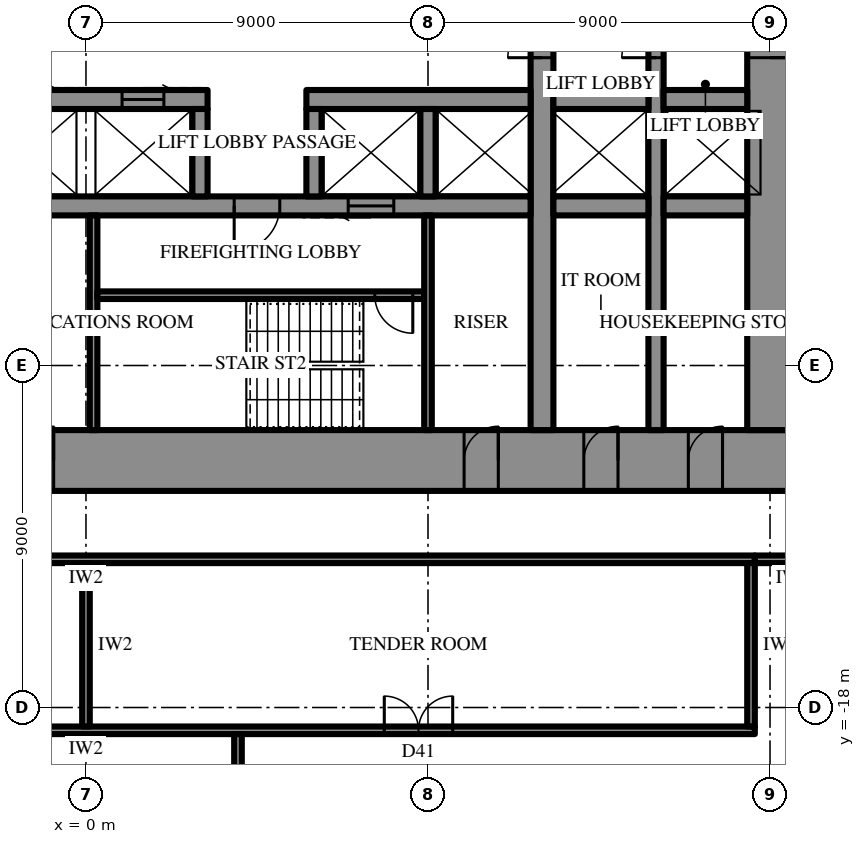
"""IFC4 building model, lengths in metres.
Left out: names, types, materials, properties, quantities, classifications, styles, units other than length and angle.
Written with IfcOpenShell. Run it as: python <this file> out.ifc"""

import sys

from ifc_helpers import new_model, si_unit, direction, frame, frame_2d, origin, place, context, subcontext, project, spatial, rectangle, extrude, element, fill, save


model = new_model("IFC4")
c1 = context("Model", 3, precision=1e-05, world=origin(), true_north=direction((0.0, 1.0)))
c2 = subcontext(c1, "Body", "Model", "MODEL_VIEW")
j1 = project(units=[si_unit("LENGTHUNIT", "METRE"), si_unit("PLANEANGLEUNIT", "RADIAN")], contexts=[c1])
p1 = place(None, origin())
s1 = spatial("IfcSite", under=j1, at=p1, CompositionType="ELEMENT")
p2 = place(p1, origin())
s2 = spatial("IfcBuilding", under=s1, at=p2, CompositionType="ELEMENT")
p3 = place(p2, frame((0.0, 0.0, 65.5)))
s3 = spatial("IfcBuildingStorey", under=s2, at=p3, CompositionType="ELEMENT", Elevation=65.5)
p4 = place(p3, frame((18.6, -11.5, 0.0), z_axis=(0.0, 0.0, 1.0), x_axis=(-1.0, 0.0, 0.0)))
e1 = element("IfcWall", 1, at=p4, inside=s3, PredefinedType="SHEAR", context=c2, shape_type="SweptSolid", body=[
    extrude(rectangle(XDim=37.2, YDim=1.6, at=frame_2d((18.6, 0.0))), origin(), (0.0, 0.0, 1.0), 4.2),
])
p5 = place(p4, frame((19.45, 0.0, 0.0)))
e2 = element("IfcOpeningElement", 2, at=p5, cuts=e1, PredefinedType="OPENING", context=c2, shape_type="SweptSolid", body=[
    extrude(rectangle(XDim=0.9, YDim=2.2, at=frame_2d((0.45, 1.1))), frame((0.0, 0.81, 0.0), z_axis=(0.0, -1.0, 0.0), x_axis=(1.0, 0.0, 0.0)), (0.0, 0.0, 1.0), 1.62),
])
p6 = place(p4, frame((22.45, 0.0, 0.0)))
e3 = element("IfcOpeningElement", 3, at=p6, cuts=e1, PredefinedType="OPENING", context=c2, shape_type="SweptSolid", body=[
    extrude(rectangle(XDim=0.9, YDim=2.2, at=frame_2d((0.45, 1.1))), frame((0.0, 0.81, 0.0), z_axis=(0.0, -1.0, 0.0), x_axis=(1.0, 0.0, 0.0)), (0.0, 0.0, 1.0), 1.62),
])
p7 = place(p4, frame((25.5, 0.0, 0.0)))
e4 = element("IfcOpeningElement", 4, at=p7, cuts=e1, PredefinedType="OPENING", context=c2, shape_type="SweptSolid", body=[
    extrude(rectangle(XDim=1.0, YDim=2.2, at=frame_2d((0.5, 1.1))), frame((0.0, 0.81, 0.0), z_axis=(0.0, -1.0, 0.0), x_axis=(1.0, 0.0, 0.0)), (0.0, 0.0, 1.0), 1.62),
])
p8 = place(p4, frame((1.85, 0.0, 0.0)))
e5 = element("IfcOpeningElement", 5, at=p8, cuts=e1, PredefinedType="OPENING", context=c2, shape_type="SweptSolid", body=[
    extrude(rectangle(XDim=0.9, YDim=2.2, at=frame_2d((0.45, 1.1))), frame((0.0, 0.81, 0.0), z_axis=(0.0, -1.0, 0.0), x_axis=(1.0, 0.0, 0.0)), (0.0, 0.0, 1.0), 1.62),
])
p9 = place(p4, frame((4.6, 0.0, 0.0)))
e6 = element("IfcOpeningElement", 6, at=p9, cuts=e1, PredefinedType="OPENING", context=c2, shape_type="SweptSolid", body=[
    extrude(rectangle(XDim=0.9, YDim=2.2, at=frame_2d((0.45, 1.1))), frame((0.0, 0.81, 0.0), z_axis=(0.0, -1.0, 0.0), x_axis=(1.0, 0.0, 0.0)), (0.0, 0.0, 1.0), 1.62),
])
p10 = place(p4, frame((7.75, 0.0, 0.0)))
e7 = element("IfcOpeningElement", 7, at=p10, cuts=e1, PredefinedType="OPENING", context=c2, shape_type="SweptSolid", body=[
    extrude(rectangle(XDim=0.9, YDim=2.2, at=frame_2d((0.45, 1.1))), frame((0.0, 0.81, 0.0), z_axis=(0.0, -1.0, 0.0), x_axis=(1.0, 0.0, 0.0)), (0.0, 0.0, 1.0), 1.62),
])
p11 = place(p4, frame((28.55, 0.0, 0.0)))
e8 = element("IfcOpeningElement", 8, at=p11, cuts=e1, PredefinedType="OPENING", context=c2, shape_type="SweptSolid", body=[
    extrude(rectangle(XDim=0.9, YDim=2.2, at=frame_2d((0.45, 1.1))), frame((0.0, 0.81, 0.0), z_axis=(0.0, -1.0, 0.0), x_axis=(1.0, 0.0, 0.0)), (0.0, 0.0, 1.0), 1.62),
])
p12 = place(p4, frame((31.7, 0.0, 0.0)))
e9 = element("IfcOpeningElement", 9, at=p12, cuts=e1, PredefinedType="OPENING", context=c2, shape_type="SweptSolid", body=[
    extrude(rectangle(XDim=0.9, YDim=2.2, at=frame_2d((0.45, 1.1))), frame((0.0, 0.81, 0.0), z_axis=(0.0, -1.0, 0.0), x_axis=(1.0, 0.0, 0.0)), (0.0, 0.0, 1.0), 1.62),
])
p13 = place(p4, frame((34.45, 0.0, 0.0)))
e10 = element("IfcOpeningElement", 10, at=p13, cuts=e1, PredefinedType="OPENING", context=c2, shape_type="SweptSolid", body=[
    extrude(rectangle(XDim=0.9, YDim=2.2, at=frame_2d((0.45, 1.1))), frame((0.0, 0.81, 0.0), z_axis=(0.0, -1.0, 0.0), x_axis=(1.0, 0.0, 0.0)), (0.0, 0.0, 1.0), 1.62),
])
p14 = place(p3, frame((18.0, -10.7, 0.0), z_axis=(0.0, 0.0, 1.0), x_axis=(0.0, 1.0, 0.0)))
e11 = element("IfcWall", 11, at=p14, inside=s3, PredefinedType="SHEAR", context=c2, shape_type="SweptSolid", body=[
    extrude(rectangle(XDim=21.4, YDim=1.2, at=frame_2d((10.7, 0.0))), origin(), (0.0, 0.0, 1.0), 4.2),
])
p15 = place(p14, frame((9.8, 0.0, 0.0)))
e12 = element("IfcOpeningElement", 12, at=p15, cuts=e11, PredefinedType="OPENING", context=c2, shape_type="SweptSolid", body=[
    extrude(rectangle(XDim=1.8, YDim=2.4, at=frame_2d((0.9, 1.2))), frame((0.0, 0.61, 0.0), z_axis=(0.0, -1.0, 0.0), x_axis=(1.0, 0.0, 0.0)), (0.0, 0.0, 1.0), 1.22),
])
p16 = place(p3, frame((12.0, -10.7, 0.0), z_axis=(0.0, 0.0, 1.0), x_axis=(0.0, 1.0, 0.0)))
e13 = element("IfcWall", 13, at=p16, inside=s3, PredefinedType="SHEAR", context=c2, shape_type="SweptSolid", body=[
    extrude(rectangle(XDim=21.4, YDim=0.6, at=frame_2d((10.7, 0.0))), origin(), (0.0, 0.0, 1.0), 4.2),
])
p17 = place(p16, frame((9.8, 0.0, 0.0)))
e14 = element("IfcOpeningElement", 14, at=p17, cuts=e13, PredefinedType="OPENING", context=c2, shape_type="SweptSolid", body=[
    extrude(rectangle(XDim=1.8, YDim=2.4, at=frame_2d((0.9, 1.2))), frame((0.0, 0.31, 0.0), z_axis=(0.0, -1.0, 0.0), x_axis=(1.0, 0.0, 0.0)), (0.0, 0.0, 1.0), 0.62),
])
p18 = place(p3, frame((15.0, -10.7, 0.0), z_axis=(0.0, 0.0, 1.0), x_axis=(0.0, 1.0, 0.0)))
e15 = element("IfcWall", 15, at=p18, inside=s3, PredefinedType="SHEAR", context=c2, shape_type="SweptSolid", body=[
    extrude(rectangle(XDim=21.4, YDim=0.4, at=frame_2d((10.7, 0.0))), origin(), (0.0, 0.0, 1.0), 4.2),
])
p19 = place(p18, frame((9.8, 0.0, 0.0)))
e16 = element("IfcOpeningElement", 16, at=p19, cuts=e15, PredefinedType="OPENING", context=c2, shape_type="SweptSolid", body=[
    extrude(rectangle(XDim=1.8, YDim=2.4, at=frame_2d((0.9, 1.2))), frame((0.0, 0.21, 0.0), z_axis=(0.0, -1.0, 0.0), x_axis=(1.0, 0.0, 0.0)), (0.0, 0.0, 1.0), 0.42),
])
p20 = place(p3, frame((17.4, -2.0, 0.0), z_axis=(0.0, 0.0, 1.0), x_axis=(-1.0, 0.0, 0.0)))
e17 = element("IfcWall", 17, at=p20, inside=s3, PredefinedType="SHEAR", context=c2, shape_type="SweptSolid", body=[
    extrude(rectangle(XDim=2.2, YDim=0.5, at=frame_2d((1.1, 0.0))), origin(), (0.0, 0.0, 1.0), 4.2),
])
p21 = place(p3, frame((14.8, -2.0, 0.0), z_axis=(0.0, 0.0, 1.0), x_axis=(-1.0, 0.0, 0.0)))
e18 = element("IfcWall", 18, at=p21, inside=s3, PredefinedType="SHEAR", context=c2, shape_type="SweptSolid", body=[
    extrude(rectangle(XDim=2.5, YDim=0.5, at=frame_2d((1.25, 0.0))), origin(), (0.0, 0.0, 1.0), 4.2),
])
p22 = place(p3, frame((11.7, -2.0, 0.0), z_axis=(0.0, 0.0, 1.0), x_axis=(-1.0, 0.0, 0.0)))
e19 = element("IfcWall", 19, at=p22, inside=s3, PredefinedType="SHEAR", context=c2, shape_type="SweptSolid", body=[
    extrude(rectangle(XDim=5.9, YDim=0.5, at=frame_2d((2.95, 0.0))), origin(), (0.0, 0.0, 1.0), 4.2),
])
p23 = place(p3, frame((3.2, -2.0, 0.0), z_axis=(0.0, 0.0, 1.0), x_axis=(-1.0, 0.0, 0.0)))
e20 = element("IfcWall", 20, at=p23, inside=s3, PredefinedType="SHEAR", context=c2, shape_type="SweptSolid", body=[
    extrude(rectangle(XDim=14.9, YDim=0.5, at=frame_2d((7.45, 0.0))), origin(), (0.0, 0.0, 1.0), 4.2),
])
p24 = place(p23, frame((1.15, 0.0, 0.0)))
e21 = element("IfcOpeningElement", 21, at=p24, cuts=e20, PredefinedType="OPENING", context=c2, shape_type="SweptSolid", body=[
    extrude(rectangle(XDim=1.1, YDim=2.2, at=frame_2d((0.55, 1.1))), frame((0.0, 0.26, 0.0), z_axis=(0.0, -1.0, 0.0), x_axis=(1.0, 0.0, 0.0)), (0.0, 0.0, 1.0), 0.52),
])
p25 = place(p23, frame((4.15, 0.0, 0.0)))
e22 = element("IfcOpeningElement", 22, at=p25, cuts=e20, PredefinedType="OPENING", context=c2, shape_type="SweptSolid", body=[
    extrude(rectangle(XDim=1.1, YDim=2.2, at=frame_2d((0.55, 1.1))), frame((0.0, 0.26, 0.0), z_axis=(0.0, -1.0, 0.0), x_axis=(1.0, 0.0, 0.0)), (0.0, 0.0, 1.0), 0.52),
])
p26 = place(p23, frame((7.15, 0.0, 0.0)))
e23 = element("IfcOpeningElement", 23, at=p26, cuts=e20, PredefinedType="OPENING", context=c2, shape_type="SweptSolid", body=[
    extrude(rectangle(XDim=1.1, YDim=2.2, at=frame_2d((0.55, 1.1))), frame((0.0, 0.26, 0.0), z_axis=(0.0, -1.0, 0.0), x_axis=(1.0, 0.0, 0.0)), (0.0, 0.0, 1.0), 0.52),
])
p27 = place(p23, frame((10.15, 0.0, 0.0)))
e24 = element("IfcOpeningElement", 24, at=p27, cuts=e20, PredefinedType="OPENING", context=c2, shape_type="SweptSolid", body=[
    extrude(rectangle(XDim=1.1, YDim=2.2, at=frame_2d((0.55, 1.1))), frame((0.0, 0.26, 0.0), z_axis=(0.0, -1.0, 0.0), x_axis=(1.0, 0.0, 0.0)), (0.0, 0.0, 1.0), 0.52),
])
p28 = place(p3, frame((17.4, -4.8, 0.0), z_axis=(0.0, 0.0, 1.0), x_axis=(-1.0, 0.0, 0.0)))
e25 = element("IfcWall", 25, at=p28, inside=s3, PredefinedType="SHEAR", context=c2, shape_type="SweptSolid", body=[
    extrude(rectangle(XDim=2.2, YDim=0.5, at=frame_2d((1.1, 0.0))), origin(), (0.0, 0.0, 1.0), 4.2),
])
p29 = place(p3, frame((14.8, -4.8, 0.0), z_axis=(0.0, 0.0, 1.0), x_axis=(-1.0, 0.0, 0.0)))
e26 = element("IfcWall", 26, at=p29, inside=s3, PredefinedType="SHEAR", context=c2, shape_type="SweptSolid", body=[
    extrude(rectangle(XDim=2.5, YDim=0.5, at=frame_2d((1.25, 0.0))), origin(), (0.0, 0.0, 1.0), 4.2),
])
p30 = place(p3, frame((11.7, -4.8, 0.0), z_axis=(0.0, 0.0, 1.0), x_axis=(-1.0, 0.0, 0.0)))
e27 = element("IfcWall", 27, at=p30, inside=s3, PredefinedType="SHEAR", context=c2, shape_type="SweptSolid", body=[
    extrude(rectangle(XDim=23.4, YDim=0.5, at=frame_2d((11.7, 0.0))), origin(), (0.0, 0.0, 1.0), 4.2),
])
p31 = place(p30, frame((6.6, 0.0, 0.0)))
e28 = element("IfcOpeningElement", 28, at=p31, cuts=e27, PredefinedType="OPENING", context=c2, shape_type="SweptSolid", body=[
    extrude(rectangle(XDim=1.2, YDim=2.2, at=frame_2d((0.6, 1.1))), frame((0.0, 0.26, 0.0), z_axis=(0.0, -1.0, 0.0), x_axis=(1.0, 0.0, 0.0)), (0.0, 0.0, 1.0), 0.52),
])
p32 = place(p30, frame((3.6, 0.0, 0.0)))
e29 = element("IfcOpeningElement", 29, at=p32, cuts=e27, PredefinedType="OPENING", context=c2, shape_type="SweptSolid", body=[
    extrude(rectangle(XDim=1.2, YDim=2.2, at=frame_2d((0.6, 1.1))), frame((0.0, 0.26, 0.0), z_axis=(0.0, -1.0, 0.0), x_axis=(1.0, 0.0, 0.0)), (0.0, 0.0, 1.0), 0.52),
])
for number, where, z_axis, x_axis in (
    (30, (9.0, -2.25, 0.0), (0.0, 0.0, 1.0), (0.0, -1.0, 0.0)),
    (31, (6.0, -2.25, 0.0), (0.0, 0.0, 1.0), (0.0, -1.0, 0.0)),
    (32, (3.0, -2.25, 0.0), (0.0, 0.0, 1.0), (0.0, -1.0, 0.0)),
):
    element("IfcWall", number, at=place(p3, frame(where, z_axis=z_axis, x_axis=x_axis)), inside=s3, PredefinedType="SHEAR", context=c2, shape_type="SweptSolid", body=[
        extrude(rectangle(XDim=2.3, YDim=0.4, at=frame_2d((1.15, 0.0))), origin(), (0.0, 0.0, 1.0), 4.2),
    ])
p33 = place(p3, frame((0.2, -5.05, 0.0), z_axis=(0.0, 0.0, 1.0), x_axis=(0.0, -1.0, 0.0)))
e33 = element("IfcWall", 33, at=p33, inside=s3, PredefinedType="SHEAR", context=c2, shape_type="SweptSolid", body=[
    extrude(rectangle(XDim=5.65, YDim=0.2, at=frame_2d((2.825, 0.0))), origin(), (0.0, 0.0, 1.0), 4.2),
])
p34 = place(p3, frame((8.9, -7.15, 0.0), z_axis=(0.0, 0.0, 1.0), x_axis=(-1.0, 0.0, 0.0)))
e34 = element("IfcWall", 34, at=p34, inside=s3, PredefinedType="SHEAR", context=c2, shape_type="SweptSolid", body=[
    extrude(rectangle(XDim=8.6, YDim=0.2, at=frame_2d((4.3, 0.0))), origin(), (0.0, 0.0, 1.0), 4.2),
])
p35 = place(p34, frame((0.3, 0.0, 0.0)))
e35 = element("IfcOpeningElement", 35, at=p35, cuts=e34, PredefinedType="OPENING", context=c2, shape_type="SweptSolid", body=[
    extrude(rectangle(XDim=1.0, YDim=2.2, at=frame_2d((0.5, 1.1))), frame((0.0, 0.11, 0.0), z_axis=(0.0, -1.0, 0.0), x_axis=(1.0, 0.0, 0.0)), (0.0, 0.0, 1.0), 0.22),
])
p36 = place(p3, frame((9.0, -5.05, 0.0), z_axis=(0.0, 0.0, 1.0), x_axis=(0.0, -1.0, 0.0)))
e36 = element("IfcWall", 36, at=p36, inside=s3, PredefinedType="PARTITIONING", context=c2, shape_type="SweptSolid", body=[
    extrude(rectangle(XDim=5.65, YDim=0.2, at=frame_2d((2.825, 0.0))), origin(), (0.0, 0.0, 1.0), 4.0),
])
p37 = place(p3, frame((17.6, -14.1, 0.0), z_axis=(0.0, 0.0, 1.0), x_axis=(-1.0, 0.0, 0.0)))
e37 = element("IfcWall", 37, at=p37, inside=s3, PredefinedType="PARTITIONING", context=c2, shape_type="SweptSolid", body=[
    extrude(rectangle(XDim=35.2, YDim=0.2, at=frame_2d((17.6, 0.0))), origin(), (0.0, 0.0, 1.0), 4.0),
])
p38 = place(p3, frame((17.6, -18.6, 0.0), z_axis=(0.0, 0.0, 1.0), x_axis=(-1.0, 0.0, 0.0)))
e38 = element("IfcWall", 38, at=p38, inside=s3, PredefinedType="PARTITIONING", context=c2, shape_type="SweptSolid", body=[
    extrude(rectangle(XDim=35.2, YDim=0.2, at=frame_2d((17.6, 0.0))), origin(), (0.0, 0.0, 1.0), 4.0),
])
p39 = place(p38, frame((7.95, 0.0, 0.0)))
e39 = element("IfcOpeningElement", 39, at=p39, cuts=e38, PredefinedType="OPENING", context=c2, shape_type="SweptSolid", body=[
    extrude(rectangle(XDim=1.8, YDim=2.4, at=frame_2d((0.9, 1.2))), frame((0.0, 0.11, 0.0), z_axis=(0.0, -1.0, 0.0), x_axis=(1.0, 0.0, 0.0)), (0.0, 0.0, 1.0), 0.22),
])
p40 = place(p38, frame((25.45, 0.0, 0.0)))
e40 = element("IfcOpeningElement", 40, at=p40, cuts=e38, PredefinedType="OPENING", context=c2, shape_type="SweptSolid", body=[
    extrude(rectangle(XDim=1.8, YDim=2.4, at=frame_2d((0.9, 1.2))), frame((0.0, 0.11, 0.0), z_axis=(0.0, -1.0, 0.0), x_axis=(1.0, 0.0, 0.0)), (0.0, 0.0, 1.0), 0.22),
])
p41 = place(p3, frame((17.5, -14.2, 0.0), z_axis=(0.0, 0.0, 1.0), x_axis=(0.0, -1.0, 0.0)))
e41 = element("IfcWall", 41, at=p41, inside=s3, PredefinedType="PARTITIONING", context=c2, shape_type="SweptSolid", body=[
    extrude(rectangle(XDim=4.3, YDim=0.2, at=frame_2d((2.15, 0.0))), origin(), (0.0, 0.0, 1.0), 4.0),
])
p42 = place(p3, frame((0.0, -14.2, 0.0), z_axis=(0.0, 0.0, 1.0), x_axis=(0.0, -1.0, 0.0)))
e42 = element("IfcWall", 42, at=p42, inside=s3, PredefinedType="PARTITIONING", context=c2, shape_type="SweptSolid", body=[
    extrude(rectangle(XDim=4.3, YDim=0.2, at=frame_2d((2.15, 0.0))), origin(), (0.0, 0.0, 1.0), 2.944),
])
p43 = place(p3, frame((19.6, -14.1, 0.0), z_axis=(0.0, 0.0, 1.0), x_axis=(-1.0, 0.0, 0.0)))
e43 = element("IfcWall", 43, at=p43, inside=s3, PredefinedType="PARTITIONING", context=c2, shape_type="SweptSolid", body=[
    extrude(rectangle(XDim=2.0, YDim=0.2, at=frame_2d((1.0, 0.0))), origin(), (0.0, 0.0, 1.0), 4.0),
])
p44 = place(p3, frame((4.0, -18.7, 0.0), z_axis=(0.0, 0.0, 1.0), x_axis=(0.0, -1.0, 0.0)))
e44 = element("IfcWall", 44, at=p44, inside=s3, PredefinedType="PARTITIONING", context=c2, shape_type="SweptSolid", body=[
    extrude(rectangle(XDim=15.1, YDim=0.2, at=frame_2d((7.55, 0.0))), origin(), (0.0, 0.0, 1.0), 4.0),
])
p45 = place(p44, frame((1.01, 0.0, 0.0)))
e45 = element("IfcOpeningElement", 45, at=p45, cuts=e44, PredefinedType="OPENING", context=c2, shape_type="SweptSolid", body=[
    extrude(rectangle(XDim=1.0, YDim=2.2, at=frame_2d((0.5, 1.1))), frame((0.0, 0.11, 0.0), z_axis=(0.0, -1.0, 0.0), x_axis=(1.0, 0.0, 0.0)), (0.0, 0.0, 1.0), 0.22),
])
p46 = place(p15, frame((1.8, 0.0, 0.0), z_axis=(0.0, 0.0, 1.0), x_axis=(-1.0, 0.0, 0.0)))
e46 = element("IfcDoor", 46, at=p46, inside=s3, OperationType="DOUBLE_DOOR_SINGLE_SWING", PredefinedType="DOOR", context=c2, shape_type="SweptSolid", body=[
    extrude(rectangle(XDim=1.8, YDim=2.4, at=frame_2d((0.9, 1.2))), frame((0.0, 0.025, 0.0), z_axis=(0.0, -1.0, 0.0), x_axis=(1.0, 0.0, 0.0)), (0.0, 0.0, 1.0), 0.05),
])
fill(e12, e46)
p47 = place(p31, origin())
e47 = element("IfcDoor", 47, at=p47, inside=s3, OperationType="SINGLE_SWING_LEFT", PredefinedType="DOOR", context=c2, shape_type="SweptSolid", body=[
    extrude(rectangle(XDim=1.2, YDim=2.2, at=frame_2d((0.6, 1.1))), frame((0.0, 0.025, 0.0), z_axis=(0.0, -1.0, 0.0), x_axis=(1.0, 0.0, 0.0)), (0.0, 0.0, 1.0), 0.05),
])
fill(e28, e47)
p48 = place(p35, origin())
e48 = element("IfcDoor", 48, at=p48, inside=s3, OperationType="SINGLE_SWING_RIGHT", PredefinedType="DOOR", context=c2, shape_type="SweptSolid", body=[
    extrude(rectangle(XDim=1.0, YDim=2.2, at=frame_2d((0.5, 1.1))), frame((0.0, 0.025, 0.0), z_axis=(0.0, -1.0, 0.0), x_axis=(1.0, 0.0, 0.0)), (0.0, 0.0, 1.0), 0.05),
])
fill(e35, e48)
p49 = place(p5, frame((0.9, 0.0, 0.0), z_axis=(0.0, 0.0, 1.0), x_axis=(-1.0, 0.0, 0.0)))
e49 = element("IfcDoor", 49, at=p49, inside=s3, OperationType="SINGLE_SWING_LEFT", PredefinedType="DOOR", context=c2, shape_type="SweptSolid", body=[
    extrude(rectangle(XDim=0.9, YDim=2.2, at=frame_2d((0.45, 1.1))), frame((0.0, 0.025, 0.0), z_axis=(0.0, -1.0, 0.0), x_axis=(1.0, 0.0, 0.0)), (0.0, 0.0, 1.0), 0.05),
])
fill(e2, e49)
p50 = place(p8, frame((0.9, 0.0, 0.0), z_axis=(0.0, 0.0, 1.0), x_axis=(-1.0, 0.0, 0.0)))
e50 = element("IfcDoor", 50, at=p50, inside=s3, OperationType="SINGLE_SWING_LEFT", PredefinedType="DOOR", context=c2, shape_type="SweptSolid", body=[
    extrude(rectangle(XDim=0.9, YDim=2.2, at=frame_2d((0.45, 1.1))), frame((0.0, 0.025, 0.0), z_axis=(0.0, -1.0, 0.0), x_axis=(1.0, 0.0, 0.0)), (0.0, 0.0, 1.0), 0.05),
])
fill(e5, e50)
p51 = place(p9, frame((0.9, 0.0, 0.0), z_axis=(0.0, 0.0, 1.0), x_axis=(-1.0, 0.0, 0.0)))
e51 = element("IfcDoor", 51, at=p51, inside=s3, OperationType="SINGLE_SWING_LEFT", PredefinedType="DOOR", context=c2, shape_type="SweptSolid", body=[
    extrude(rectangle(XDim=0.9, YDim=2.2, at=frame_2d((0.45, 1.1))), frame((0.0, 0.025, 0.0), z_axis=(0.0, -1.0, 0.0), x_axis=(1.0, 0.0, 0.0)), (0.0, 0.0, 1.0), 0.05),
])
fill(e6, e51)
p52 = place(p10, frame((0.9, 0.0, 0.0), z_axis=(0.0, 0.0, 1.0), x_axis=(-1.0, 0.0, 0.0)))
e52 = element("IfcDoor", 52, at=p52, inside=s3, OperationType="SINGLE_SWING_LEFT", PredefinedType="DOOR", context=c2, shape_type="SweptSolid", body=[
    extrude(rectangle(XDim=0.9, YDim=2.2, at=frame_2d((0.45, 1.1))), frame((0.0, 0.025, 0.0), z_axis=(0.0, -1.0, 0.0), x_axis=(1.0, 0.0, 0.0)), (0.0, 0.0, 1.0), 0.05),
])
fill(e7, e52)
p53 = place(p17, origin())
e53 = element("IfcDoor", 53, at=p53, inside=s3, OperationType="DOUBLE_DOOR_SINGLE_SWING", PredefinedType="DOOR", context=c2, shape_type="SweptSolid", body=[
    extrude(rectangle(XDim=1.8, YDim=2.4, at=frame_2d((0.9, 1.2))), frame((0.0, 0.025, 0.0), z_axis=(0.0, -1.0, 0.0), x_axis=(1.0, 0.0, 0.0)), (0.0, 0.0, 1.0), 0.05),
])
fill(e14, e53)
p54 = place(p19, origin())
e54 = element("IfcDoor", 54, at=p54, inside=s3, OperationType="DOUBLE_DOOR_SINGLE_SWING", PredefinedType="DOOR", context=c2, shape_type="SweptSolid", body=[
    extrude(rectangle(XDim=1.8, YDim=2.4, at=frame_2d((0.9, 1.2))), frame((0.0, 0.025, 0.0), z_axis=(0.0, -1.0, 0.0), x_axis=(1.0, 0.0, 0.0)), (0.0, 0.0, 1.0), 0.05),
])
fill(e16, e54)
p55 = place(p32, origin())
e55 = element("IfcDoor", 55, at=p55, inside=s3, OperationType="SLIDING_TO_LEFT", PredefinedType="DOOR", context=c2, shape_type="SweptSolid", body=[
    extrude(rectangle(XDim=1.2, YDim=2.2, at=frame_2d((0.6, 1.1))), frame((0.0, 0.025, 0.0), z_axis=(0.0, -1.0, 0.0), x_axis=(1.0, 0.0, 0.0)), (0.0, 0.0, 1.0), 0.05),
])
fill(e29, e55)
p56 = place(p24, frame((1.1, 0.0, 0.0), z_axis=(0.0, 0.0, 1.0), x_axis=(-1.0, 0.0, 0.0)))
e56 = element("IfcDoor", 56, at=p56, inside=s3, OperationType="SLIDING_TO_LEFT", PredefinedType="DOOR", context=c2, shape_type="SweptSolid", body=[
    extrude(rectangle(XDim=1.1, YDim=2.2, at=frame_2d((0.55, 1.1))), frame((0.0, 0.025, 0.0), z_axis=(0.0, -1.0, 0.0), x_axis=(1.0, 0.0, 0.0)), (0.0, 0.0, 1.0), 0.05),
])
fill(e21, e56)
p57 = place(p39, frame((1.8, 0.0, 0.0), z_axis=(0.0, 0.0, 1.0), x_axis=(-1.0, 0.0, 0.0)))
e57 = element("IfcDoor", 57, at=p57, inside=s3, OperationType="DOUBLE_DOOR_SINGLE_SWING", PredefinedType="DOOR", context=c2, shape_type="SweptSolid", body=[
    extrude(rectangle(XDim=1.8, YDim=2.4, at=frame_2d((0.9, 1.2))), frame((0.0, 0.025, 0.0), z_axis=(0.0, -1.0, 0.0), x_axis=(1.0, 0.0, 0.0)), (0.0, 0.0, 1.0), 0.05),
])
fill(e39, e57)
save(model, sys.argv[1])
